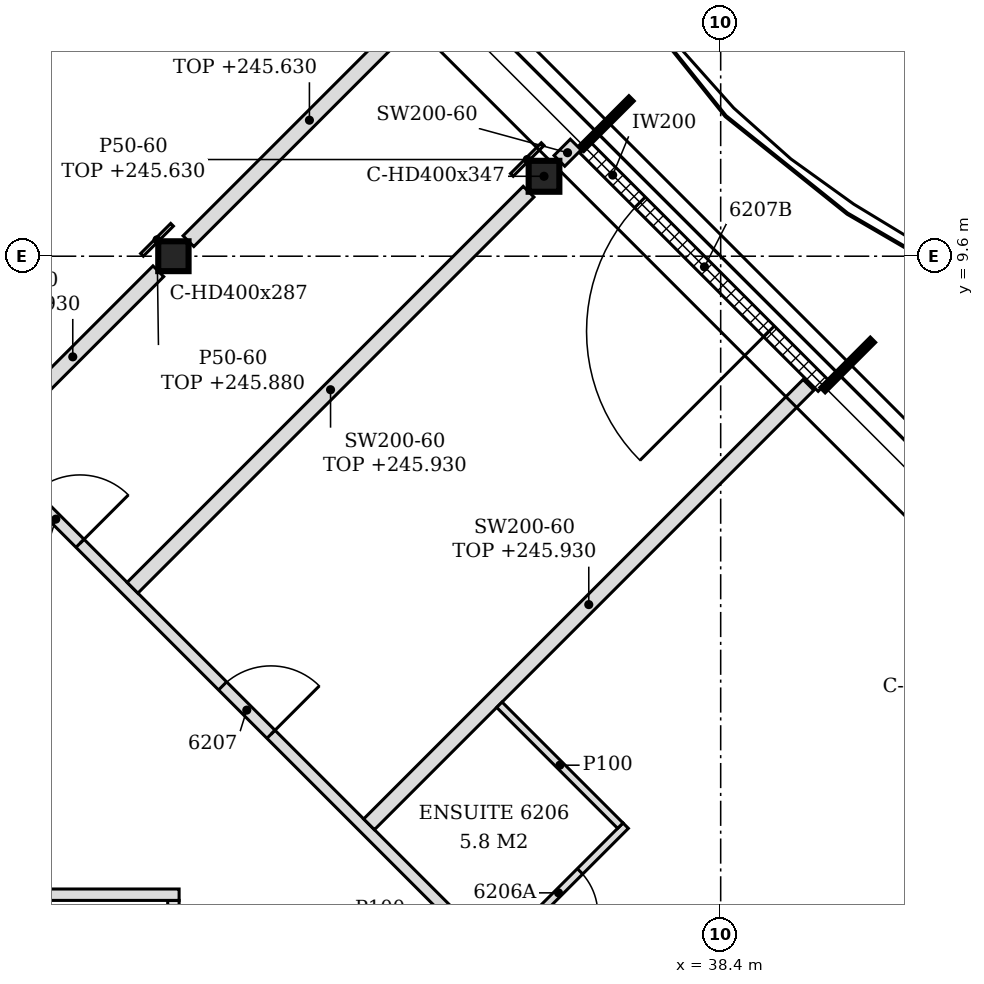
"""IFC4 building model, lengths in metres.
Left out: names, types, materials, properties, quantities, classifications, styles, units other than length and angle.
Written with IfcOpenShell. Run it as: python <this file> out.ifc"""

import sys

from ifc_helpers import new_model, si_unit, direction, frame, frame_2d, origin, origin_2d, place, context, subcontext, project, spatial, polyline, rectangle, i_section, outline, extrude, element, fill, save


model = new_model("IFC4")
c1 = context("Model", 3, precision=1e-05, world=origin(), true_north=direction((0.0, 1.0)))
c2 = subcontext(c1, "Body", "Model", "MODEL_VIEW")
j1 = project(units=[si_unit("LENGTHUNIT", "METRE"), si_unit("PLANEANGLEUNIT", "RADIAN")], contexts=[c1])
p1 = place(None, origin())
s1 = spatial("IfcSite", under=j1, at=p1, CompositionType="ELEMENT")
p2 = place(p1, origin())
s2 = spatial("IfcBuilding", under=s1, at=p2, CompositionType="ELEMENT")
p3 = place(p2, frame((0.0, 0.0, 243.0)))
s3 = spatial("IfcBuildingStorey", under=s2, at=p3, CompositionType="ELEMENT", Elevation=243.0)
p4 = place(p3, frame((36.076, 10.652, -0.15), z_axis=(0.0, 0.0, 1.0), x_axis=(1.0, 0.0, 0.0)))
e1 = element("IfcColumn", 1, at=p4, inside=s3, PredefinedType="COLUMN", context=c2, shape_type="SweptSolid", body=[
    extrude(i_section(OverallWidth=0.404, OverallDepth=0.407, WebThickness=0.027, FlangeThickness=0.044, FilletRadius=0.015, at=origin_2d()), origin(), (0.0, 0.0, 1.0), 3.6),
])
p5 = place(p3, frame((31.2, 9.6, -0.15), z_axis=(0.0, 0.0, 1.0), x_axis=(1.0, 0.0, 0.0)))
e2 = element("IfcColumn", 2, at=p5, inside=s3, PredefinedType="COLUMN", context=c2, shape_type="SweptSolid", body=[
    extrude(i_section(OverallWidth=0.399, OverallDepth=0.393, WebThickness=0.023, FlangeThickness=0.037, FilletRadius=0.015, at=origin_2d()), origin(), (0.0, 0.0, 1.0), 3.6),
])
p6 = place(p3, frame((39.753, 7.893, 0.0), z_axis=(0.0, 0.0, 1.0), x_axis=(-0.707106781187, 0.707106781187, 0.0)))
e3 = element("IfcWall", 3, at=p6, inside=s3, PredefinedType="NOTDEFINED", context=c2, shape_type="SweptSolid", body=[
    extrude(rectangle(XDim=4.431, YDim=0.2, at=frame_2d((2.215, 0.0))), origin(), (0.0, 0.0, 1.0), 3.45),
])
p7 = place(p6, frame((1.015, 0.0, 0.0)))
e4 = element("IfcOpeningElement", 4, at=p7, cuts=e3, PredefinedType="OPENING", context=c2, shape_type="SweptSolid", body=[
    extrude(rectangle(XDim=2.4, YDim=2.4, at=frame_2d((1.2, 1.2))), frame((0.0, 0.11, 0.0), z_axis=(0.0, -1.0, 0.0), x_axis=(1.0, 0.0, 0.0)), (0.0, 0.0, 1.0), 0.22),
])
p8 = place(p3, frame((31.2, 0.197, 0.0), z_axis=(0.0, 0.0, 1.0), x_axis=(0.0, 1.0, 0.0)))
e5 = element("IfcWall", 5, at=p8, inside=s3, PredefinedType="PARTITIONING", context=c2, shape_type="SweptSolid", body=[
    extrude(rectangle(XDim=0.928, YDim=0.15, at=frame_2d((0.464, 0.0))), origin(), (0.0, 0.0, 1.0), 2.93),
])
p9 = place(p3, frame((35.383, 0.341, 0.0), z_axis=(0.0, 0.0, 1.0), x_axis=(0.707106781187, 0.707106781187, 0.0)))
e6 = element("IfcWall", 6, at=p9, inside=s3, PredefinedType="PARTITIONING", context=c2, shape_type="SweptSolid", body=[
    extrude(rectangle(XDim=2.5, YDim=0.1, at=frame_2d((1.25, 0.0))), origin(), (0.0, 0.0, 1.0), 3.45),
])
p10 = place(p9, frame((0.85, 0.0, 0.0)))
e7 = element("IfcOpeningElement", 7, at=p10, cuts=e6, PredefinedType="OPENING", context=c2, shape_type="SweptSolid", body=[
    extrude(rectangle(XDim=0.8, YDim=2.1, at=frame_2d((0.4, 1.05))), frame((0.0, 0.06, 0.0), z_axis=(0.0, -1.0, 0.0), x_axis=(1.0, 0.0, 0.0)), (0.0, 0.0, 1.0), 0.12),
])
p11 = place(p3, frame((34.8, 0.994, 0.0), z_axis=(0.0, 0.0, 1.0), x_axis=(-0.707099634543, 0.707113927758, 0.0)))
e8 = element("IfcWall", 8, at=p11, inside=s3, PredefinedType="PARTITIONING", context=c2, shape_type="SweptSolid", body=[
    extrude(rectangle(XDim=17.081, YDim=0.15, at=frame_2d((8.541, 0.0))), origin(), (0.0, 0.0, 1.0), 2.88),
])
p12 = place(p11, frame((3.276, 0.0, 0.0)))
e9 = element("IfcOpeningElement", 9, at=p12, cuts=e8, PredefinedType="OPENING", context=c2, shape_type="SweptSolid", body=[
    extrude(rectangle(XDim=0.9, YDim=2.1, at=frame_2d((0.45, 1.05))), frame((0.0, 0.085, 0.0), z_axis=(0.0, -1.0, 0.0), x_axis=(1.0, 0.0, 0.0)), (0.0, 0.0, 1.0), 0.17),
])
p13 = place(p11, frame((6.829, 0.0, 0.0)))
e10 = element("IfcOpeningElement", 10, at=p13, cuts=e8, PredefinedType="OPENING", context=c2, shape_type="SweptSolid", body=[
    extrude(rectangle(XDim=0.9, YDim=2.1, at=frame_2d((0.45, 1.05))), frame((0.0, 0.085, 0.0), z_axis=(0.0, -1.0, 0.0), x_axis=(1.0, 0.0, 0.0)), (0.0, 0.0, 1.0), 0.17),
])
p14 = place(p11, frame((11.23, 0.0, 0.0)))
e11 = element("IfcOpeningElement", 11, at=p14, cuts=e8, PredefinedType="OPENING", context=c2, shape_type="SweptSolid", body=[
    extrude(rectangle(XDim=0.9, YDim=2.1, at=frame_2d((0.45, 1.05))), frame((0.0, 0.085, 0.0), z_axis=(0.0, -1.0, 0.0), x_axis=(1.0, 0.0, 0.0)), (0.0, 0.0, 1.0), 0.17),
])
p15 = place(p3, frame((19.125, 1.2, 0.0), z_axis=(0.0, 0.0, 1.0), x_axis=(1.0, 0.0, 0.0)))
e12 = element("IfcWall", 12, at=p15, inside=s3, PredefinedType="PARTITIONING", context=c2, shape_type="SweptSolid", body=[
    extrude(outline(polyline([(0.0, 0.0), (12.15, 0.0), (12.15, 2.93), (11.925, 2.93), (11.923, 3.45), (0.225, 3.45), (0.223, 2.83), (0.0, 2.83), (0.0, 0.0)])), frame((0.0, 0.075, 0.0), z_axis=(0.0, -1.0, 0.0), x_axis=(1.0, 0.0, 0.0)), (0.0, 0.0, 1.0), 0.15),
])
p16 = place(p15, frame((5.625, 0.0, 0.0)))
e13 = element("IfcOpeningElement", 13, at=p16, cuts=e12, PredefinedType="OPENING", context=c2, shape_type="SweptSolid", body=[
    extrude(rectangle(XDim=0.9, YDim=2.1, at=frame_2d((0.45, 1.05))), frame((0.0, 0.085, 0.0), z_axis=(0.0, -1.0, 0.0), x_axis=(1.0, 0.0, 0.0)), (0.0, 0.0, 1.0), 0.17),
])
p17 = place(p3, frame((33.774, 2.126, 0.0), z_axis=(0.0, 0.0, 1.0), x_axis=(0.707121711178, 0.70709185088, 0.0)))
e14 = element("IfcWall", 14, at=p17, inside=s3, PredefinedType="PARTITIONING", context=c2, shape_type="SweptSolid", body=[
    extrude(rectangle(XDim=8.176, YDim=0.2, at=frame_2d((4.088, 0.0))), origin(), (0.0, 0.0, 1.0), 2.93),
])
p18 = place(p3, frame((37.08, 2.108, 0.0), z_axis=(0.0, 0.0, 1.0), x_axis=(-0.707106781187, 0.707106781187, 0.0)))
e15 = element("IfcWall", 15, at=p18, inside=s3, PredefinedType="PARTITIONING", context=c2, shape_type="SweptSolid", body=[
    extrude(rectangle(XDim=2.25, YDim=0.1, at=frame_2d((1.125, 0.0))), origin(), (0.0, 0.0, 1.0), 3.45),
])
p19 = place(p3, frame((30.662, 5.238, 0.0), z_axis=(0.0, 0.0, 1.0), x_axis=(0.707106781187, 0.707106781187, 0.0)))
e16 = element("IfcWall", 16, at=p19, inside=s3, PredefinedType="PARTITIONING", context=c2, shape_type="SweptSolid", body=[
    extrude(rectangle(XDim=7.369, YDim=0.2, at=frame_2d((3.685, 0.0))), origin(), (0.0, 0.0, 1.0), 2.93),
])
p20 = place(p3, frame((28.75, 7.15, 0.0), z_axis=(0.0, 0.0, 1.0), x_axis=(0.7070684525, 0.707145107796, 0.0)))
e17 = element("IfcWall", 17, at=p20, inside=s3, PredefinedType="PARTITIONING", context=c2, shape_type="SweptSolid", body=[
    extrude(rectangle(XDim=3.185, YDim=0.2, at=frame_2d((1.592, 0.0))), origin(), (0.0, 0.0, 1.0), 2.93),
])
p21 = place(p3, frame((31.398, 9.798, 0.0), z_axis=(0.0, 0.0, 1.0), x_axis=(0.707133900936, 0.707079660397, 0.0)))
e18 = element("IfcWall", 18, at=p21, inside=s3, PredefinedType="PARTITIONING", context=c2, shape_type="SweptSolid", body=[
    extrude(rectangle(XDim=4.501, YDim=0.2, at=frame_2d((2.25, 0.0))), origin(), (0.0, 0.0, 1.0), 2.63),
])
p22 = place(p3, frame((36.278, 10.854, 0.0), z_axis=(0.0, 0.0, 1.0), x_axis=(0.707509117806, 0.706704215511, 0.0)))
e19 = element("IfcWall", 19, at=p22, inside=s3, PredefinedType="PARTITIONING", context=c2, shape_type="SweptSolid", body=[
    extrude(rectangle(XDim=0.303, YDim=0.2, at=frame_2d((0.152, 0.0))), origin(), (0.0, 0.0, 1.0), 3.45),
])
p23 = place(p3, frame((24.438, 11.462, 0.0), z_axis=(0.0, 0.0, 1.0), x_axis=(0.707090216072, 0.707123345913, 0.0)))
e20 = element("IfcWall", 20, at=p23, inside=s3, PredefinedType="PARTITIONING", context=c2, shape_type="SweptSolid", body=[
    extrude(rectangle(XDim=7.369, YDim=0.2, at=frame_2d((3.685, 0.0))), origin(), (0.0, 0.0, 1.0), 2.88),
])
p24 = place(p3, frame((35.653, 10.669, 0.0), z_axis=(0.0, 0.0, 1.0), x_axis=(0.707106781187, 0.707106781187, 0.0)))
e21 = element("IfcWall", 21, at=p24, inside=s3, PredefinedType="PARTITIONING", context=c2, shape_type="SweptSolid", body=[
    extrude(rectangle(XDim=0.573, YDim=0.05, at=frame_2d((0.287, 0.0))), origin(), (0.0, 0.0, 1.0), 2.63),
])
p25 = place(p3, frame((30.786, 9.618, 0.0), z_axis=(0.0, 0.0, 1.0), x_axis=(0.707106781187, 0.707106781187, 0.0)))
e22 = element("IfcWall", 22, at=p25, inside=s3, PredefinedType="PARTITIONING", context=c2, shape_type="SweptSolid", body=[
    extrude(rectangle(XDim=0.56, YDim=0.05, at=frame_2d((0.28, 0.0))), origin(), (0.0, 0.0, 1.0), 2.88),
])
p26 = place(p7, origin())
e23 = element("IfcDoor", 23, at=p26, inside=s3, OperationType="SINGLE_SWING_LEFT", PredefinedType="DOOR", context=c2, shape_type="SweptSolid", body=[
    extrude(rectangle(XDim=2.4, YDim=2.4, at=frame_2d((1.2, 1.2))), frame((0.0, 0.025, 0.0), z_axis=(0.0, -1.0, 0.0), x_axis=(1.0, 0.0, 0.0)), (0.0, 0.0, 1.0), 0.05),
])
fill(e4, e23)
p27 = place(p10, frame((0.8, 0.0, 0.0), z_axis=(0.0, 0.0, 1.0), x_axis=(-1.0, 0.0, 0.0)))
e24 = element("IfcDoor", 24, at=p27, inside=s3, OperationType="SINGLE_SWING_RIGHT", PredefinedType="DOOR", context=c2, shape_type="SweptSolid", body=[
    extrude(rectangle(XDim=0.8, YDim=2.1, at=frame_2d((0.4, 1.05))), frame((0.0, 0.025, 0.0), z_axis=(0.0, -1.0, 0.0), x_axis=(1.0, 0.0, 0.0)), (0.0, 0.0, 1.0), 0.05),
])
fill(e7, e24)
p28 = place(p12, frame((0.9, 0.0, 0.0), z_axis=(0.0, 0.0, 1.0), x_axis=(-1.0, 0.0, 0.0)))
e25 = element("IfcDoor", 25, at=p28, inside=s3, OperationType="SINGLE_SWING_RIGHT", PredefinedType="DOOR", context=c2, shape_type="SweptSolid", body=[
    extrude(rectangle(XDim=0.9, YDim=2.1, at=frame_2d((0.45, 1.05))), frame((0.0, 0.025, 0.0), z_axis=(0.0, -1.0, 0.0), x_axis=(1.0, 0.0, 0.0)), (0.0, 0.0, 1.0), 0.05),
])
fill(e9, e25)
p29 = place(p13, frame((0.9, 0.0, 0.0), z_axis=(0.0, 0.0, 1.0), x_axis=(-1.0, 0.0, 0.0)))
e26 = element("IfcDoor", 26, at=p29, inside=s3, OperationType="SINGLE_SWING_RIGHT", PredefinedType="DOOR", context=c2, shape_type="SweptSolid", body=[
    extrude(rectangle(XDim=0.9, YDim=2.1, at=frame_2d((0.45, 1.05))), frame((0.0, 0.025, 0.0), z_axis=(0.0, -1.0, 0.0), x_axis=(1.0, 0.0, 0.0)), (0.0, 0.0, 1.0), 0.05),
])
fill(e10, e26)
save(model, sys.argv[1])
